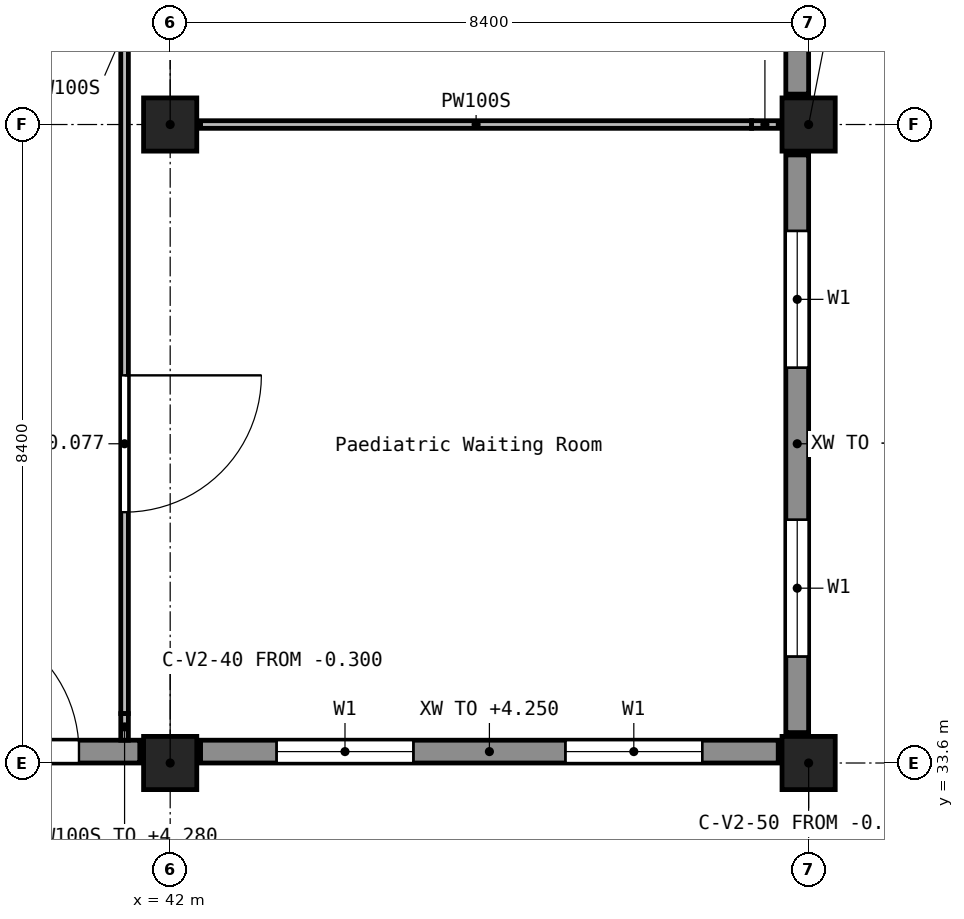
"""IFC4 building model, lengths in metres.
Left out: names, types, materials, properties, quantities, classifications, styles, units other than length and angle.
Written with IfcOpenShell. Run it as: python <this file> out.ifc"""

import sys

from ifc_helpers import new_model, si_unit, direction, frame, frame_2d, origin, origin_2d, place, context, subcontext, project, spatial, rectangle, extrude, element, fill, save


model = new_model("IFC4")
c1 = context("Model", 3, precision=1e-05, world=origin(), true_north=direction((0.0, 1.0)))
c2 = subcontext(c1, "Body", "Model", "MODEL_VIEW")
j1 = project(units=[si_unit("LENGTHUNIT", "METRE"), si_unit("PLANEANGLEUNIT", "RADIAN")], contexts=[c1])
p1 = place(None, origin())
s1 = spatial("IfcSite", under=j1, at=p1, CompositionType="ELEMENT")
p2 = place(p1, origin())
s2 = spatial("IfcBuilding", under=s1, at=p2, CompositionType="ELEMENT")
p3 = place(p2, origin())
s3 = spatial("IfcBuildingStorey", under=s2, at=p3, CompositionType="ELEMENT", Elevation=0.0)
for number, where, z_axis, x_axis in (
    (1, (42.0, 33.6, -0.3), (0.0, 0.0, 1.0), (1.0, 0.0, 0.0)),
    (2, (42.0, 42.0, -0.3), (0.0, 0.0, 1.0), (1.0, 0.0, 0.0)),
    (3, (50.4, 33.6, -0.3), (0.0, 0.0, 1.0), (1.0, 0.0, 0.0)),
    (4, (50.4, 42.0, -0.3), (0.0, 0.0, 1.0), (1.0, 0.0, 0.0)),
):
    element("IfcColumn", number, at=place(p3, frame(where, z_axis=z_axis, x_axis=x_axis)), inside=s3, PredefinedType="COLUMN", context=c2, shape_type="SweptSolid", body=[
        extrude(rectangle(XDim=0.7, YDim=0.7, at=origin_2d()), origin(), (0.0, 0.0, 1.0), 5.7),
    ])
p4 = place(p3, frame((50.25, 34.0, 0.0), z_axis=(0.0, 0.0, 1.0), x_axis=(0.0, 1.0, 0.0)))
e5 = element("IfcWall", 5, at=p4, inside=s3, PredefinedType="STANDARD", context=c2, shape_type="SweptSolid", body=[
    extrude(rectangle(XDim=7.6, YDim=0.3, at=frame_2d((3.8, 0.0))), origin(), (0.0, 0.0, 1.0), 4.25),
])
p5 = place(p4, frame((1.0, 0.0, 0.9)))
e6 = element("IfcOpeningElement", 6, at=p5, cuts=e5, PredefinedType="OPENING", context=c2, shape_type="SweptSolid", body=[
    extrude(rectangle(XDim=1.8, YDim=1.5, at=frame_2d((0.9, 0.75))), frame((0.0, 0.16, 0.0), z_axis=(0.0, -1.0, 0.0), x_axis=(1.0, 0.0, 0.0)), (0.0, 0.0, 1.0), 0.32),
])
p6 = place(p4, frame((4.8, 0.0, 0.9)))
e7 = element("IfcOpeningElement", 7, at=p6, cuts=e5, PredefinedType="OPENING", context=c2, shape_type="SweptSolid", body=[
    extrude(rectangle(XDim=1.8, YDim=1.5, at=frame_2d((0.9, 0.75))), frame((0.0, 0.16, 0.0), z_axis=(0.0, -1.0, 0.0), x_axis=(1.0, 0.0, 0.0)), (0.0, 0.0, 1.0), 0.32),
])
p7 = place(p3, frame((50.25, 42.4, 0.0), z_axis=(0.0, 0.0, 1.0), x_axis=(0.0, 1.0, 0.0)))
e8 = element("IfcWall", 8, at=p7, inside=s3, PredefinedType="STANDARD", context=c2, shape_type="SweptSolid", body=[
    extrude(rectangle(XDim=7.6, YDim=0.3, at=frame_2d((3.8, 0.0))), origin(), (0.0, 0.0, 1.0), 4.25),
])
p8 = place(p7, frame((1.0, 0.0, 0.9)))
e9 = element("IfcOpeningElement", 9, at=p8, cuts=e8, PredefinedType="OPENING", context=c2, shape_type="SweptSolid", body=[
    extrude(rectangle(XDim=1.8, YDim=1.5, at=frame_2d((0.9, 0.75))), frame((0.0, 0.16, 0.0), z_axis=(0.0, -1.0, 0.0), x_axis=(1.0, 0.0, 0.0)), (0.0, 0.0, 1.0), 0.32),
])
p9 = place(p7, frame((5.2, 0.0, 0.9)))
e10 = element("IfcOpeningElement", 10, at=p9, cuts=e8, PredefinedType="OPENING", context=c2, shape_type="SweptSolid", body=[
    extrude(rectangle(XDim=1.8, YDim=1.5, at=frame_2d((0.9, 0.75))), frame((0.0, 0.16, 0.0), z_axis=(0.0, -1.0, 0.0), x_axis=(1.0, 0.0, 0.0)), (0.0, 0.0, 1.0), 0.32),
])
p10 = place(p3, frame((34.0, 33.75, 0.0), z_axis=(0.0, 0.0, 1.0), x_axis=(1.0, 0.0, 0.0)))
e11 = element("IfcWall", 11, at=p10, inside=s3, PredefinedType="STANDARD", context=c2, shape_type="SweptSolid", body=[
    extrude(rectangle(XDim=7.6, YDim=0.3, at=frame_2d((3.8, 0.0))), origin(), (0.0, 0.0, 1.0), 4.25),
])
p11 = place(p10, frame((5.0, 0.0, 0.0)))
e12 = element("IfcOpeningElement", 12, at=p11, cuts=e11, PredefinedType="OPENING", context=c2, shape_type="SweptSolid", body=[
    extrude(rectangle(XDim=1.8, YDim=2.1, at=frame_2d((0.9, 1.05))), frame((0.0, 0.16, 0.0), z_axis=(0.0, -1.0, 0.0), x_axis=(1.0, 0.0, 0.0)), (0.0, 0.0, 1.0), 0.32),
])
p12 = place(p10, frame((1.0, 0.0, 0.9)))
e13 = element("IfcOpeningElement", 13, at=p12, cuts=e11, PredefinedType="OPENING", context=c2, shape_type="SweptSolid", body=[
    extrude(rectangle(XDim=1.8, YDim=1.5, at=frame_2d((0.9, 0.75))), frame((0.0, 0.16, 0.0), z_axis=(0.0, -1.0, 0.0), x_axis=(1.0, 0.0, 0.0)), (0.0, 0.0, 1.0), 0.32),
])
p13 = place(p3, frame((42.4, 33.75, 0.0), z_axis=(0.0, 0.0, 1.0), x_axis=(1.0, 0.0, 0.0)))
e14 = element("IfcWall", 14, at=p13, inside=s3, PredefinedType="STANDARD", context=c2, shape_type="SweptSolid", body=[
    extrude(rectangle(XDim=7.6, YDim=0.3, at=frame_2d((3.8, 0.0))), origin(), (0.0, 0.0, 1.0), 4.25),
])
p14 = place(p13, frame((1.0, 0.0, 0.9)))
e15 = element("IfcOpeningElement", 15, at=p14, cuts=e14, PredefinedType="OPENING", context=c2, shape_type="SweptSolid", body=[
    extrude(rectangle(XDim=1.8, YDim=1.5, at=frame_2d((0.9, 0.75))), frame((0.0, 0.16, 0.0), z_axis=(0.0, -1.0, 0.0), x_axis=(1.0, 0.0, 0.0)), (0.0, 0.0, 1.0), 0.32),
])
p15 = place(p13, frame((4.8, 0.0, 0.9)))
e16 = element("IfcOpeningElement", 16, at=p15, cuts=e14, PredefinedType="OPENING", context=c2, shape_type="SweptSolid", body=[
    extrude(rectangle(XDim=1.8, YDim=1.5, at=frame_2d((0.9, 0.75))), frame((0.0, 0.16, 0.0), z_axis=(0.0, -1.0, 0.0), x_axis=(1.0, 0.0, 0.0)), (0.0, 0.0, 1.0), 0.32),
])
p16 = place(p3, frame((41.4, 52.25, 0.0), z_axis=(0.0, 0.0, 1.0), x_axis=(0.0, -1.0, 0.0)))
e17 = element("IfcWall", 17, at=p16, inside=s3, PredefinedType="PARTITIONING", context=c2, shape_type="SweptSolid", body=[
    extrude(rectangle(XDim=18.0, YDim=0.1, at=frame_2d((9.0, 0.0))), origin(), (0.0, 0.0, 1.0), 5.05),
])
p17 = place(p16, frame((0.5, 0.0, 0.0)))
e18 = element("IfcOpeningElement", 18, at=p17, cuts=e17, PredefinedType="OPENING", context=c2, shape_type="SweptSolid", body=[
    extrude(rectangle(XDim=0.9, YDim=2.1, at=frame_2d((0.45, 1.05))), frame((0.0, 0.06, 0.0), z_axis=(0.0, -1.0, 0.0), x_axis=(1.0, 0.0, 0.0)), (0.0, 0.0, 1.0), 0.12),
])
p18 = place(p16, frame((2.85, 0.0, 0.0)))
e19 = element("IfcOpeningElement", 19, at=p18, cuts=e17, PredefinedType="OPENING", context=c2, shape_type="SweptSolid", body=[
    extrude(rectangle(XDim=1.0, YDim=2.1, at=frame_2d((0.5, 1.05))), frame((0.0, 0.06, 0.0), z_axis=(0.0, -1.0, 0.0), x_axis=(1.0, 0.0, 0.0)), (0.0, 0.0, 1.0), 0.12),
])
p19 = place(p16, frame((7.05, 0.0, 0.0)))
e20 = element("IfcOpeningElement", 20, at=p19, cuts=e17, PredefinedType="OPENING", context=c2, shape_type="SweptSolid", body=[
    extrude(rectangle(XDim=1.0, YDim=2.1, at=frame_2d((0.5, 1.05))), frame((0.0, 0.06, 0.0), z_axis=(0.0, -1.0, 0.0), x_axis=(1.0, 0.0, 0.0)), (0.0, 0.0, 1.0), 0.12),
])
p20 = place(p16, frame((13.55, 0.0, 0.0)))
e21 = element("IfcOpeningElement", 21, at=p20, cuts=e17, PredefinedType="OPENING", context=c2, shape_type="SweptSolid", body=[
    extrude(rectangle(XDim=1.8, YDim=2.1, at=frame_2d((0.9, 1.05))), frame((0.0, 0.06, 0.0), z_axis=(0.0, -1.0, 0.0), x_axis=(1.0, 0.0, 0.0)), (0.0, 0.0, 1.0), 0.12),
])
p21 = place(p3, frame((41.4, 34.25, 0.0), z_axis=(0.0, 0.0, 1.0), x_axis=(0.0, -1.0, 0.0)))
e22 = element("IfcWall", 22, at=p21, inside=s3, PredefinedType="PARTITIONING", context=c2, shape_type="SweptSolid", body=[
    extrude(rectangle(XDim=0.35, YDim=0.1, at=frame_2d((0.175, 0.0))), origin(), (0.0, 0.0, 1.0), 4.28),
])
p22 = place(p3, frame((42.4, 42.0, 0.0), z_axis=(0.0, 0.0, 1.0), x_axis=(1.0, 0.0, 0.0)))
e23 = element("IfcWall", 23, at=p22, inside=s3, PredefinedType="PARTITIONING", context=c2, shape_type="SweptSolid", body=[
    extrude(rectangle(XDim=7.25, YDim=0.1, at=frame_2d((3.625, 0.0))), origin(), (0.0, 0.0, 1.0), 5.05),
])
p23 = place(p3, frame((49.65, 42.0, 0.0), z_axis=(0.0, 0.0, 1.0), x_axis=(1.0, 0.0, 0.0)))
e24 = element("IfcWall", 24, at=p23, inside=s3, PredefinedType="PARTITIONING", context=c2, shape_type="SweptSolid", body=[
    extrude(rectangle(XDim=0.35, YDim=0.1, at=frame_2d((0.175, 0.0))), origin(), (0.0, 0.0, 1.0), 4.28),
])
p24 = place(p11, frame((1.8, 0.0, 0.0), z_axis=(0.0, 0.0, 1.0), x_axis=(-1.0, 0.0, 0.0)))
e25 = element("IfcDoor", 25, at=p24, inside=s3, OperationType="SINGLE_SWING_LEFT", PredefinedType="DOOR", context=c2, shape_type="SweptSolid", body=[
    extrude(rectangle(XDim=1.8, YDim=2.1, at=frame_2d((0.9, 1.05))), frame((0.0, 0.025, 0.0), z_axis=(0.0, -1.0, 0.0), x_axis=(1.0, 0.0, 0.0)), (0.0, 0.0, 1.0), 0.05),
])
fill(e12, e25)
p25 = place(p5, origin())
e26 = element("IfcWindow", 26, at=p25, inside=s3, PartitioningType="SINGLE_PANEL", PredefinedType="WINDOW", context=c2, shape_type="SweptSolid", body=[
    extrude(rectangle(XDim=1.8, YDim=1.5, at=frame_2d((0.9, 0.75))), frame((0.0, 0.03, 0.0), z_axis=(0.0, -1.0, 0.0), x_axis=(1.0, 0.0, 0.0)), (0.0, 0.0, 1.0), 0.06),
])
fill(e6, e26)
p26 = place(p6, origin())
e27 = element("IfcWindow", 27, at=p26, inside=s3, PartitioningType="SINGLE_PANEL", PredefinedType="WINDOW", context=c2, shape_type="SweptSolid", body=[
    extrude(rectangle(XDim=1.8, YDim=1.5, at=frame_2d((0.9, 0.75))), frame((0.0, 0.03, 0.0), z_axis=(0.0, -1.0, 0.0), x_axis=(1.0, 0.0, 0.0)), (0.0, 0.0, 1.0), 0.06),
])
fill(e7, e27)
p27 = place(p14, origin())
e28 = element("IfcWindow", 28, at=p27, inside=s3, PartitioningType="SINGLE_PANEL", PredefinedType="WINDOW", context=c2, shape_type="SweptSolid", body=[
    extrude(rectangle(XDim=1.8, YDim=1.5, at=frame_2d((0.9, 0.75))), frame((0.0, 0.03, 0.0), z_axis=(0.0, -1.0, 0.0), x_axis=(1.0, 0.0, 0.0)), (0.0, 0.0, 1.0), 0.06),
])
fill(e15, e28)
p28 = place(p15, origin())
e29 = element("IfcWindow", 29, at=p28, inside=s3, PartitioningType="SINGLE_PANEL", PredefinedType="WINDOW", context=c2, shape_type="SweptSolid", body=[
    extrude(rectangle(XDim=1.8, YDim=1.5, at=frame_2d((0.9, 0.75))), frame((0.0, 0.03, 0.0), z_axis=(0.0, -1.0, 0.0), x_axis=(1.0, 0.0, 0.0)), (0.0, 0.0, 1.0), 0.06),
])
fill(e16, e29)
p29 = place(p20, origin())
e30 = element("IfcDoor", 30, at=p29, inside=s3, OperationType="DOUBLE_DOOR_SINGLE_SWING", PredefinedType="DOOR", context=c2, shape_type="SweptSolid", body=[
    extrude(rectangle(XDim=1.8, YDim=2.1, at=frame_2d((0.9, 1.05))), frame((0.0, 0.025, 0.0), z_axis=(0.0, -1.0, 0.0), x_axis=(1.0, 0.0, 0.0)), (0.0, 0.0, 1.0), 0.05),
])
fill(e21, e30)
save(model, sys.argv[1])
